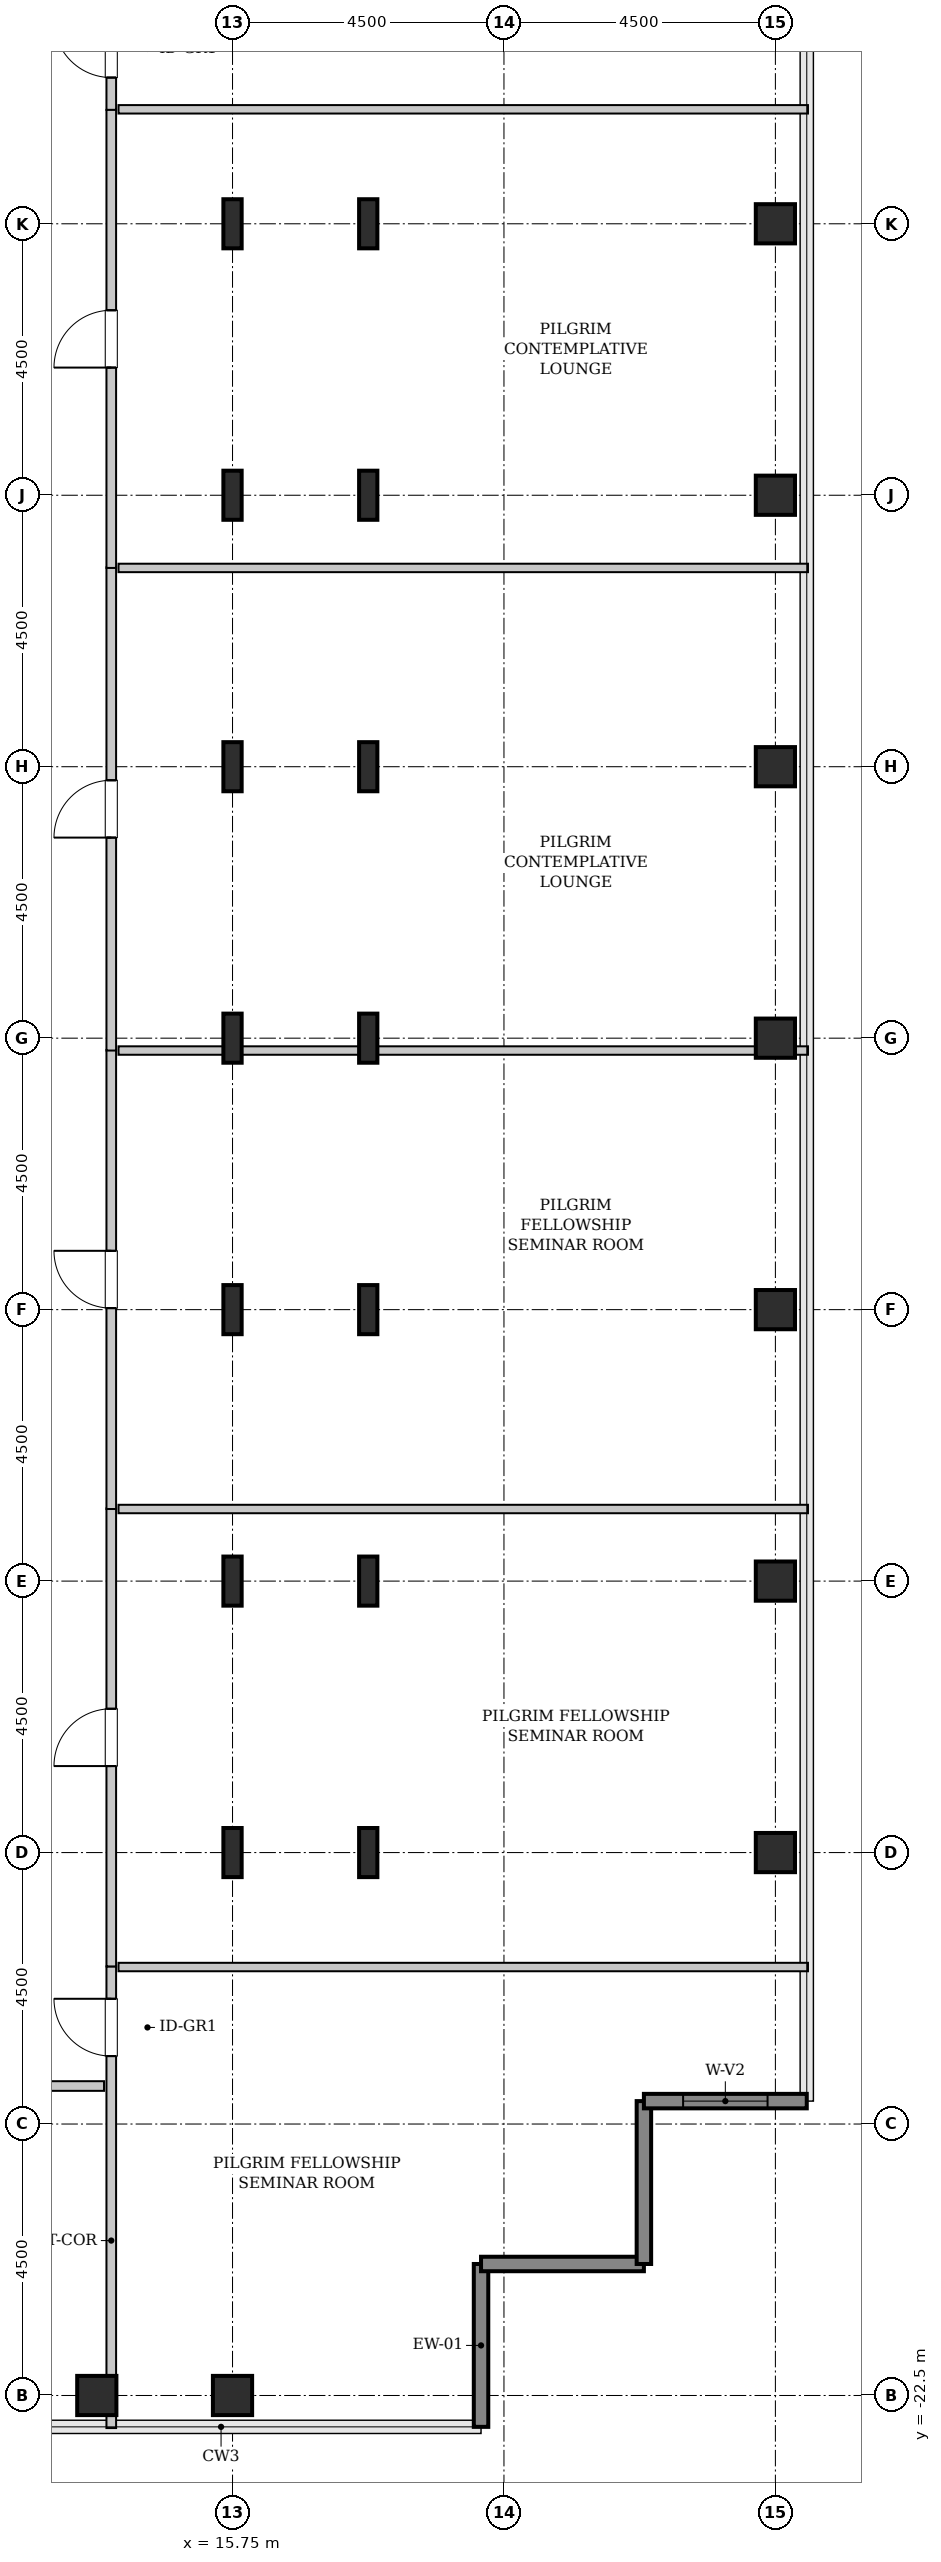
"""IFC4 building model, lengths in metres.
Left out: names, types, materials, properties, quantities, classifications, styles, units other than length and angle.
Written with IfcOpenShell. Run it as: python <this file> out.ifc"""

import sys

from ifc_helpers import new_model, si_unit, direction, frame, frame_2d, origin, origin_2d, place, context, subcontext, project, spatial, rectangle, hollow_rectangle, i_section, extrude, source, transform, mapped, element, fill, save


model = new_model("IFC4")
c1 = context("Model", 3, precision=1e-05, world=origin(), true_north=direction((0.0, 1.0)))
c2 = subcontext(c1, "Body", "Model", "MODEL_VIEW")
j1 = project(units=[si_unit("LENGTHUNIT", "METRE"), si_unit("PLANEANGLEUNIT", "RADIAN")], contexts=[c1])
p1 = place(None, origin())
s1 = spatial("IfcSite", under=j1, at=p1, CompositionType="ELEMENT")
p2 = place(p1, origin())
s2 = spatial("IfcBuilding", under=s1, at=p2, CompositionType="ELEMENT")
p3 = place(p2, frame((0.0, 0.0, 237.0)))
s3 = spatial("IfcBuildingStorey", under=s2, at=p3, CompositionType="ELEMENT", Elevation=237.0)
m1 = source(origin(), c2, "Body", "SweptSolid", [
    extrude(hollow_rectangle(XDim=0.65, YDim=0.65, WallThickness=0.032, InnerFilletRadius=0.032, OuterFilletRadius=0.064, at=origin_2d()), origin(), (0.0, 0.0, 1.0), 3.8),
])
for number, where, z_axis, x_axis in (
    (1, (13.5, -22.5, 0.0), (0.0, 0.0, 1.0), (1.0, 0.0, 0.0)),
    (2, (15.75, -22.5, 0.0), (0.0, 0.0, 1.0), (1.0, 0.0, 0.0)),
):
    element("IfcColumn", number, at=place(p3, frame(where, z_axis=z_axis, x_axis=x_axis)), inside=s3, PredefinedType="COLUMN", context=c2, shape_type="MappedRepresentation", body=[
        mapped(m1, transform((0.0, 0.0, 0.0), x_axis=(1.0, 0.0, 0.0), y_axis=(0.0, 1.0, 0.0), z_axis=(0.0, 0.0, 1.0), scale=1.0)),
    ])
m2 = source(origin(), c2, "Body", "SweptSolid", [
    extrude(i_section(OverallWidth=0.303, OverallDepth=0.814, WebThickness=0.021, FlangeThickness=0.04, FilletRadius=0.03, at=origin_2d()), origin(), (0.0, 0.0, 1.0), 3.8),
])
for number, where, z_axis, x_axis in (
    (3, (15.75, -13.5, 0.0), (0.0, 0.0, 1.0), (1.0, 0.0, 0.0)),
    (4, (15.75, -9.0, 0.0), (0.0, 0.0, 1.0), (1.0, 0.0, 0.0)),
    (5, (15.75, -4.5, 0.0), (0.0, 0.0, 1.0), (1.0, 0.0, 0.0)),
    (6, (15.75, 0.0, 0.0), (0.0, 0.0, 1.0), (1.0, 0.0, 0.0)),
    (7, (15.75, 4.5, 0.0), (0.0, 0.0, 1.0), (1.0, 0.0, 0.0)),
    (8, (15.75, 9.0, 0.0), (0.0, 0.0, 1.0), (1.0, 0.0, 0.0)),
    (9, (15.75, 13.5, 0.0), (0.0, 0.0, 1.0), (1.0, 0.0, 0.0)),
    (10, (18.0, -13.5, 0.0), (0.0, 0.0, 1.0), (1.0, 0.0, 0.0)),
    (11, (18.0, -9.0, 0.0), (0.0, 0.0, 1.0), (1.0, 0.0, 0.0)),
    (12, (18.0, -4.5, 0.0), (0.0, 0.0, 1.0), (1.0, 0.0, 0.0)),
    (13, (18.0, 0.0, 0.0), (0.0, 0.0, 1.0), (1.0, 0.0, 0.0)),
    (14, (18.0, 4.5, 0.0), (0.0, 0.0, 1.0), (1.0, 0.0, 0.0)),
    (15, (18.0, 9.0, 0.0), (0.0, 0.0, 1.0), (1.0, 0.0, 0.0)),
    (16, (18.0, 13.5, 0.0), (0.0, 0.0, 1.0), (1.0, 0.0, 0.0)),
):
    element("IfcColumn", number, at=place(p3, frame(where, z_axis=z_axis, x_axis=x_axis)), inside=s3, PredefinedType="COLUMN", context=c2, shape_type="MappedRepresentation", body=[
        mapped(m2, transform((0.0, 0.0, 0.0), x_axis=(1.0, 0.0, 0.0), y_axis=(0.0, 1.0, 0.0), z_axis=(0.0, 0.0, 1.0), scale=1.0)),
    ])
for number, where, z_axis, x_axis in (
    (17, (24.75, -13.5, 0.0), (0.0, 0.0, 1.0), (1.0, 0.0, 0.0)),
    (18, (24.75, -9.0, 0.0), (0.0, 0.0, 1.0), (1.0, 0.0, 0.0)),
    (19, (24.75, -4.5, 0.0), (0.0, 0.0, 1.0), (1.0, 0.0, 0.0)),
    (20, (24.75, 0.0, 0.0), (0.0, 0.0, 1.0), (1.0, 0.0, 0.0)),
    (21, (24.75, 4.5, 0.0), (0.0, 0.0, 1.0), (1.0, 0.0, 0.0)),
    (22, (24.75, 9.0, 0.0), (0.0, 0.0, 1.0), (1.0, 0.0, 0.0)),
    (23, (24.75, 13.5, 0.0), (0.0, 0.0, 1.0), (1.0, 0.0, 0.0)),
):
    element("IfcColumn", number, at=place(p3, frame(where, z_axis=z_axis, x_axis=x_axis)), inside=s3, PredefinedType="COLUMN", context=c2, shape_type="MappedRepresentation", body=[
        mapped(m1, transform((0.0, 0.0, 0.0), x_axis=(1.0, 0.0, 0.0), y_axis=(0.0, 1.0, 0.0), z_axis=(0.0, 0.0, 1.0), scale=1.0)),
    ])
m3 = source(origin(), c2, "Body", "SweptSolid", [
    extrude(rectangle(XDim=2.7, YDim=0.24, at=frame_2d((1.35, 0.0))), origin(), (0.0, 0.0, 1.0), 3.55),
])
for number, where, z_axis, x_axis in (
    (24, (19.87, -23.02, 0.0), (0.0, 0.0, 1.0), (0.0, 1.0, 0.0)),
    (25, (19.87, -20.32, 0.0), (0.0, 0.0, 1.0), (1.0, 0.0, 0.0)),
    (26, (22.57, -20.32, 0.0), (0.0, 0.0, 1.0), (0.0, 1.0, 0.0)),
):
    element("IfcWall", number, at=place(p3, frame(where, z_axis=z_axis, x_axis=x_axis)), inside=s3, PredefinedType="SHEAR", context=c2, shape_type="MappedRepresentation", body=[
        mapped(m3, transform((0.0, 0.0, 0.0), x_axis=(1.0, 0.0, 0.0), y_axis=(0.0, 1.0, 0.0), z_axis=(0.0, 0.0, 1.0), scale=1.0)),
    ])
p4 = place(p3, frame((22.57, -17.62, 0.0), z_axis=(0.0, 0.0, 1.0), x_axis=(1.0, 0.0, 0.0)))
e27 = element("IfcWall", 27, at=p4, inside=s3, PredefinedType="SHEAR", context=c2, shape_type="MappedRepresentation", body=[
    mapped(m3, transform((0.0, 0.0, 0.0), x_axis=(1.0, 0.0, 0.0), y_axis=(0.0, 1.0, 0.0), z_axis=(0.0, 0.0, 1.0), scale=1.0)),
])
p5 = place(p4, frame((0.65, 0.0, 0.85)))
e28 = element("IfcOpeningElement", 28, at=p5, cuts=e27, PredefinedType="OPENING", context=c2, shape_type="SweptSolid", body=[
    extrude(rectangle(XDim=1.4, YDim=1.8, at=frame_2d((0.7, 0.9))), frame((0.0, 0.13, 0.0), z_axis=(0.0, -1.0, 0.0), x_axis=(1.0, 0.0, 0.0)), (0.0, 0.0, 1.0), 0.26),
])
m4 = source(origin(), c2, "Body", "SweptSolid", [
    extrude(rectangle(XDim=7.653, YDim=0.16, at=frame_2d((3.826, 0.0))), origin(), (0.0, 0.0, 1.0), 3.535),
])
p6 = place(p3, frame((13.74, -23.04, 0.0), z_axis=(0.0, 0.0, 1.0), x_axis=(0.0, 1.0, 0.0)))
e29 = element("IfcWall", 29, at=p6, inside=s3, PredefinedType="PARTITIONING", context=c2, shape_type="MappedRepresentation", body=[
    mapped(m4, transform((0.0, 0.0, 0.0), x_axis=(1.0, 0.0, 0.0), y_axis=(0.0, 1.0, 0.0), z_axis=(0.0, 0.0, 1.0), scale=1.0)),
])
p7 = place(p6, frame((6.166, 0.0, 0.0)))
e30 = element("IfcOpeningElement", 30, at=p7, cuts=e29, PredefinedType="OPENING", context=c2, shape_type="SweptSolid", body=[
    extrude(rectangle(XDim=0.95, YDim=2.1, at=frame_2d((0.475, 1.05))), frame((0.0, 0.09, 0.0), z_axis=(0.0, -1.0, 0.0), x_axis=(1.0, 0.0, 0.0)), (0.0, 0.0, 1.0), 0.18),
])
m5 = source(origin(), c2, "Body", "SweptSolid", [
    extrude(rectangle(XDim=11.43, YDim=0.14, at=frame_2d((5.715, 0.0))), origin(), (0.0, 0.0, 1.0), 3.535),
])
p8 = place(p3, frame((13.86, -15.397, 0.0), z_axis=(0.0, 0.0, 1.0), x_axis=(1.0, 0.0, 0.0)))
e31 = element("IfcWall", 31, at=p8, inside=s3, PredefinedType="PARTITIONING", context=c2, shape_type="MappedRepresentation", body=[
    mapped(m5, transform((0.0, 0.0, 0.0), x_axis=(1.0, 0.0, 0.0), y_axis=(0.0, 1.0, 0.0), z_axis=(0.0, 0.0, 1.0), scale=1.0)),
])
m6 = source(origin(), c2, "Body", "SweptSolid", [
    extrude(rectangle(XDim=7.593, YDim=0.16, at=frame_2d((3.796, 0.0))), origin(), (0.0, 0.0, 1.0), 3.535),
])
p9 = place(p3, frame((13.74, -15.387, 0.0), z_axis=(0.0, 0.0, 1.0), x_axis=(0.0, 1.0, 0.0)))
e32 = element("IfcWall", 32, at=p9, inside=s3, PredefinedType="PARTITIONING", context=c2, shape_type="MappedRepresentation", body=[
    mapped(m6, transform((0.0, 0.0, 0.0), x_axis=(1.0, 0.0, 0.0), y_axis=(0.0, 1.0, 0.0), z_axis=(0.0, 0.0, 1.0), scale=1.0)),
])
p10 = place(p9, frame((3.321, 0.0, 0.0)))
e33 = element("IfcOpeningElement", 33, at=p10, cuts=e32, PredefinedType="OPENING", context=c2, shape_type="SweptSolid", body=[
    extrude(rectangle(XDim=0.95, YDim=2.1, at=frame_2d((0.475, 1.05))), frame((0.0, 0.09, 0.0), z_axis=(0.0, -1.0, 0.0), x_axis=(1.0, 0.0, 0.0)), (0.0, 0.0, 1.0), 0.18),
])
p11 = place(p3, frame((13.86, -7.805, 0.0), z_axis=(0.0, 0.0, 1.0), x_axis=(1.0, 0.0, 0.0)))
e34 = element("IfcWall", 34, at=p11, inside=s3, PredefinedType="PARTITIONING", context=c2, shape_type="MappedRepresentation", body=[
    mapped(m5, transform((0.0, 0.0, 0.0), x_axis=(1.0, 0.0, 0.0), y_axis=(0.0, 1.0, 0.0), z_axis=(0.0, 0.0, 1.0), scale=1.0)),
])
m7 = source(origin(), c2, "Body", "SweptSolid", [
    extrude(rectangle(XDim=7.61, YDim=0.16, at=frame_2d((3.805, 0.0))), origin(), (0.0, 0.0, 1.0), 3.535),
])
p12 = place(p3, frame((13.74, -7.805, 0.0), z_axis=(0.0, 0.0, 1.0), x_axis=(0.0, 1.0, 0.0)))
e35 = element("IfcWall", 35, at=p12, inside=s3, PredefinedType="PARTITIONING", context=c2, shape_type="MappedRepresentation", body=[
    mapped(m7, transform((0.0, 0.0, 0.0), x_axis=(1.0, 0.0, 0.0), y_axis=(0.0, 1.0, 0.0), z_axis=(0.0, 0.0, 1.0), scale=1.0)),
])
p13 = place(p12, frame((3.33, 0.0, 0.0)))
e36 = element("IfcOpeningElement", 36, at=p13, cuts=e35, PredefinedType="OPENING", context=c2, shape_type="SweptSolid", body=[
    extrude(rectangle(XDim=0.95, YDim=2.1, at=frame_2d((0.475, 1.05))), frame((0.0, 0.09, 0.0), z_axis=(0.0, -1.0, 0.0), x_axis=(1.0, 0.0, 0.0)), (0.0, 0.0, 1.0), 0.18),
])
m8 = source(origin(), c2, "Body", "SweptSolid", [
    extrude(rectangle(XDim=11.43, YDim=0.14, at=frame_2d((5.715, 0.0))), origin(), (0.0, 0.0, 1.0), 2.925),
])
p14 = place(p3, frame((13.86, -0.205, 0.0), z_axis=(0.0, 0.0, 1.0), x_axis=(1.0, 0.0, 0.0)))
e37 = element("IfcWall", 37, at=p14, inside=s3, PredefinedType="PARTITIONING", context=c2, shape_type="MappedRepresentation", body=[
    mapped(m8, transform((0.0, 0.0, 0.0), x_axis=(1.0, 0.0, 0.0), y_axis=(0.0, 1.0, 0.0), z_axis=(0.0, 0.0, 1.0), scale=1.0)),
])
m9 = source(origin(), c2, "Body", "SweptSolid", [
    extrude(rectangle(XDim=8.01, YDim=0.16, at=frame_2d((4.005, 0.0))), origin(), (0.0, 0.0, 1.0), 3.535),
])
p15 = place(p3, frame((13.74, -0.205, 0.0), z_axis=(0.0, 0.0, 1.0), x_axis=(0.0, 1.0, 0.0)))
e38 = element("IfcWall", 38, at=p15, inside=s3, PredefinedType="PARTITIONING", context=c2, shape_type="MappedRepresentation", body=[
    mapped(m9, transform((0.0, 0.0, 0.0), x_axis=(1.0, 0.0, 0.0), y_axis=(0.0, 1.0, 0.0), z_axis=(0.0, 0.0, 1.0), scale=1.0)),
])
p16 = place(p15, frame((3.53, 0.0, 0.0)))
e39 = element("IfcOpeningElement", 39, at=p16, cuts=e38, PredefinedType="OPENING", context=c2, shape_type="SweptSolid", body=[
    extrude(rectangle(XDim=0.95, YDim=2.1, at=frame_2d((0.475, 1.05))), frame((0.0, 0.09, 0.0), z_axis=(0.0, -1.0, 0.0), x_axis=(1.0, 0.0, 0.0)), (0.0, 0.0, 1.0), 0.18),
])
p17 = place(p3, frame((13.86, 7.795, 0.0), z_axis=(0.0, 0.0, 1.0), x_axis=(1.0, 0.0, 0.0)))
e40 = element("IfcWall", 40, at=p17, inside=s3, PredefinedType="PARTITIONING", context=c2, shape_type="MappedRepresentation", body=[
    mapped(m5, transform((0.0, 0.0, 0.0), x_axis=(1.0, 0.0, 0.0), y_axis=(0.0, 1.0, 0.0), z_axis=(0.0, 0.0, 1.0), scale=1.0)),
])
p18 = place(p3, frame((13.74, 15.387, 0.0), z_axis=(0.0, 0.0, 1.0), x_axis=(0.0, 1.0, 0.0)))
e41 = element("IfcWall", 41, at=p18, inside=s3, PredefinedType="PARTITIONING", context=c2, shape_type="MappedRepresentation", body=[
    mapped(m4, transform((0.0, 0.0, 0.0), x_axis=(1.0, 0.0, 0.0), y_axis=(0.0, 1.0, 0.0), z_axis=(0.0, 0.0, 1.0), scale=1.0)),
])
p19 = place(p18, frame((0.536, 0.0, 0.0)))
e42 = element("IfcOpeningElement", 42, at=p19, cuts=e41, PredefinedType="OPENING", context=c2, shape_type="SweptSolid", body=[
    extrude(rectangle(XDim=0.95, YDim=2.1, at=frame_2d((0.475, 1.05))), frame((0.0, 0.09, 0.0), z_axis=(0.0, -1.0, 0.0), x_axis=(1.0, 0.0, 0.0)), (0.0, 0.0, 1.0), 0.18),
])
p20 = place(p3, frame((13.86, 15.397, 0.0), z_axis=(0.0, 0.0, 1.0), x_axis=(1.0, 0.0, 0.0)))
e43 = element("IfcWall", 43, at=p20, inside=s3, PredefinedType="PARTITIONING", context=c2, shape_type="MappedRepresentation", body=[
    mapped(m5, transform((0.0, 0.0, 0.0), x_axis=(1.0, 0.0, 0.0), y_axis=(0.0, 1.0, 0.0), z_axis=(0.0, 0.0, 1.0), scale=1.0)),
])
p21 = place(p3, frame((13.74, 7.795, 0.0), z_axis=(0.0, 0.0, 1.0), x_axis=(0.0, 1.0, 0.0)))
e44 = element("IfcWall", 44, at=p21, inside=s3, PredefinedType="PARTITIONING", context=c2, shape_type="MappedRepresentation", body=[
    mapped(m6, transform((0.0, 0.0, 0.0), x_axis=(1.0, 0.0, 0.0), y_axis=(0.0, 1.0, 0.0), z_axis=(0.0, 0.0, 1.0), scale=1.0)),
])
p22 = place(p21, frame((3.321, 0.0, 0.0)))
e45 = element("IfcOpeningElement", 45, at=p22, cuts=e44, PredefinedType="OPENING", context=c2, shape_type="SweptSolid", body=[
    extrude(rectangle(XDim=0.95, YDim=2.1, at=frame_2d((0.475, 1.05))), frame((0.0, 0.09, 0.0), z_axis=(0.0, -1.0, 0.0), x_axis=(1.0, 0.0, 0.0)), (0.0, 0.0, 1.0), 0.18),
])
m10 = source(origin(), c2, "Body", "SweptSolid", [
    extrude(rectangle(XDim=5.225, YDim=0.16, at=frame_2d((2.613, 0.0))), origin(), (0.0, 0.0, 1.0), 3.535),
])
p23 = place(p3, frame((8.395, -17.37, 0.0), z_axis=(0.0, 0.0, 1.0), x_axis=(1.0, 0.0, 0.0)))
e46 = element("IfcWall", 46, at=p23, inside=s3, PredefinedType="PARTITIONING", context=c2, shape_type="MappedRepresentation", body=[
    mapped(m10, transform((0.0, 0.0, 0.0), x_axis=(1.0, 0.0, 0.0), y_axis=(0.0, 1.0, 0.0), z_axis=(0.0, 0.0, 1.0), scale=1.0)),
])
p24 = place(p23, frame((1.543, 0.0, 0.0)))
e47 = element("IfcOpeningElement", 47, at=p24, cuts=e46, PredefinedType="OPENING", context=c2, shape_type="SweptSolid", body=[
    extrude(rectangle(XDim=0.95, YDim=2.1, at=frame_2d((0.475, 1.05))), frame((0.0, 0.09, 0.0), z_axis=(0.0, -1.0, 0.0), x_axis=(1.0, 0.0, 0.0)), (0.0, 0.0, 1.0), 0.18),
])
m11 = source(origin(), c2, "Body", "SweptSolid", [
    extrude(rectangle(XDim=1.4, YDim=1.8, at=frame_2d((0.7, 0.9))), frame((0.0, 0.03, 0.0), z_axis=(0.0, -1.0, 0.0), x_axis=(1.0, 0.0, 0.0)), (0.0, 0.0, 1.0), 0.06),
])
p25 = place(p5, origin())
e48 = element("IfcWindow", 48, at=p25, inside=s3, PartitioningType="SINGLE_PANEL", PredefinedType="WINDOW", context=c2, shape_type="MappedRepresentation", body=[
    mapped(m11, transform((0.0, 0.0, 0.0), x_axis=(1.0, 0.0, 0.0), y_axis=(0.0, 1.0, 0.0), z_axis=(0.0, 0.0, 1.0), scale=1.0)),
])
fill(e28, e48)
m12 = source(origin(), c2, "Body", "SweptSolid", [
    extrude(rectangle(XDim=0.95, YDim=2.1, at=frame_2d((0.475, 1.05))), frame((0.0, 0.025, 0.0), z_axis=(0.0, -1.0, 0.0), x_axis=(1.0, 0.0, 0.0)), (0.0, 0.0, 1.0), 0.05),
])
p26 = place(p7, origin())
e49 = element("IfcDoor", 49, at=p26, inside=s3, OperationType="SINGLE_SWING_RIGHT", PredefinedType="DOOR", context=c2, shape_type="MappedRepresentation", body=[
    mapped(m12, transform((0.0, 0.0, 0.0), x_axis=(1.0, 0.0, 0.0), y_axis=(0.0, 1.0, 0.0), z_axis=(0.0, 0.0, 1.0), scale=1.0)),
])
fill(e30, e49)
p27 = place(p10, origin())
e50 = element("IfcDoor", 50, at=p27, inside=s3, OperationType="SINGLE_SWING_LEFT", PredefinedType="DOOR", context=c2, shape_type="MappedRepresentation", body=[
    mapped(m12, transform((0.0, 0.0, 0.0), x_axis=(1.0, 0.0, 0.0), y_axis=(0.0, 1.0, 0.0), z_axis=(0.0, 0.0, 1.0), scale=1.0)),
])
fill(e33, e50)
p28 = place(p13, origin())
e51 = element("IfcDoor", 51, at=p28, inside=s3, OperationType="SINGLE_SWING_RIGHT", PredefinedType="DOOR", context=c2, shape_type="MappedRepresentation", body=[
    mapped(m12, transform((0.0, 0.0, 0.0), x_axis=(1.0, 0.0, 0.0), y_axis=(0.0, 1.0, 0.0), z_axis=(0.0, 0.0, 1.0), scale=1.0)),
])
fill(e36, e51)
p29 = place(p16, origin())
e52 = element("IfcDoor", 52, at=p29, inside=s3, OperationType="SINGLE_SWING_LEFT", PredefinedType="DOOR", context=c2, shape_type="MappedRepresentation", body=[
    mapped(m12, transform((0.0, 0.0, 0.0), x_axis=(1.0, 0.0, 0.0), y_axis=(0.0, 1.0, 0.0), z_axis=(0.0, 0.0, 1.0), scale=1.0)),
])
fill(e39, e52)
p30 = place(p19, origin())
e53 = element("IfcDoor", 53, at=p30, inside=s3, OperationType="SINGLE_SWING_RIGHT", PredefinedType="DOOR", context=c2, shape_type="MappedRepresentation", body=[
    mapped(m12, transform((0.0, 0.0, 0.0), x_axis=(1.0, 0.0, 0.0), y_axis=(0.0, 1.0, 0.0), z_axis=(0.0, 0.0, 1.0), scale=1.0)),
])
fill(e42, e53)
p31 = place(p22, origin())
e54 = element("IfcDoor", 54, at=p31, inside=s3, OperationType="SINGLE_SWING_LEFT", PredefinedType="DOOR", context=c2, shape_type="MappedRepresentation", body=[
    mapped(m12, transform((0.0, 0.0, 0.0), x_axis=(1.0, 0.0, 0.0), y_axis=(0.0, 1.0, 0.0), z_axis=(0.0, 0.0, 1.0), scale=1.0)),
])
fill(e45, e54)
save(model, sys.argv[1])
